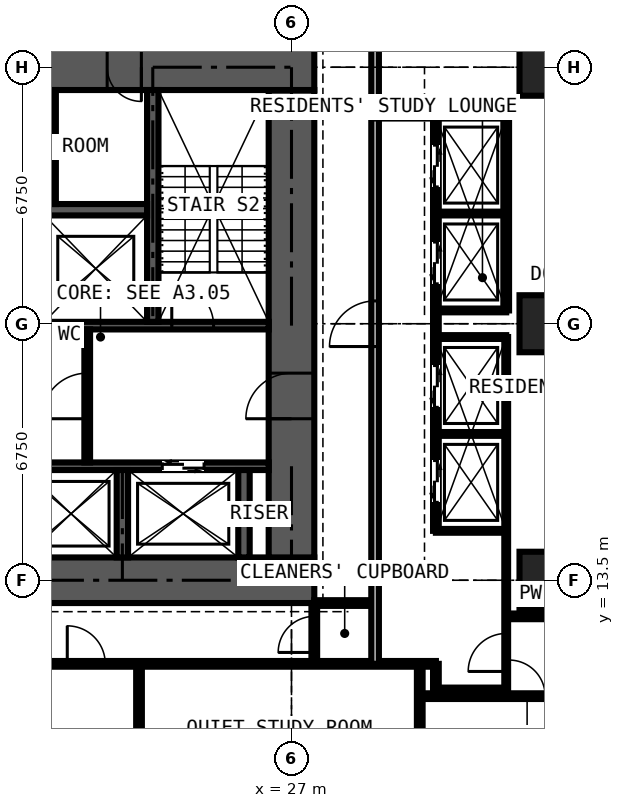
"""IFC4 building model, lengths in metres.
Left out: names, types, materials, properties, quantities, classifications, styles, units other than length and angle.
Written with IfcOpenShell. Run it as: python <this file> out.ifc"""

import sys

from ifc_helpers import new_model, si_unit, direction, frame, frame_2d, origin, origin_2d, place, context, subcontext, project, spatial, rectangle, extrude, element, fill, save


model = new_model("IFC4")
c1 = context("Model", 3, precision=1e-05, world=origin(), true_north=direction((0.0, 1.0)))
c2 = subcontext(c1, "Body", "Model", "MODEL_VIEW")
j1 = project(units=[si_unit("LENGTHUNIT", "METRE"), si_unit("PLANEANGLEUNIT", "RADIAN")], contexts=[c1])
p1 = place(None, origin())
s1 = spatial("IfcSite", under=j1, at=p1, CompositionType="ELEMENT")
p2 = place(p1, origin())
s2 = spatial("IfcBuilding", under=s1, at=p2, CompositionType="ELEMENT")
p3 = place(p2, frame((0.0, 0.0, 116.1)))
s3 = spatial("IfcBuildingStorey", under=s2, at=p3, CompositionType="ELEMENT", Elevation=116.1)
for number, where, z_axis, x_axis in (
    (1, (33.75, 13.5, 0.0), (0.0, 0.0, 1.0), (1.0, 0.0, 0.0)),
    (2, (33.75, 20.25, 0.0), (0.0, 0.0, 1.0), (1.0, 0.0, 0.0)),
    (3, (33.75, 27.0, 0.0), (0.0, 0.0, 1.0), (1.0, 0.0, 0.0)),
):
    element("IfcColumn", number, at=place(p3, frame(where, z_axis=z_axis, x_axis=x_axis)), inside=s3, PredefinedType="COLUMN", context=c2, shape_type="SweptSolid", body=[
        extrude(rectangle(XDim=1.5, YDim=1.5, at=origin_2d()), origin(), (0.0, 0.0, 1.0), 3.6),
    ])
p4 = place(p3, frame((12.9, 13.5, 0.0), z_axis=(0.0, 0.0, 1.0), x_axis=(1.0, 0.0, 0.0)))
e4 = element("IfcWall", 4, at=p4, inside=s3, PredefinedType="SHEAR", context=c2, shape_type="SweptSolid", body=[
    extrude(rectangle(XDim=14.7, YDim=1.2, at=frame_2d((7.35, 0.0))), origin(), (0.0, 0.0, 1.0), 3.6),
])
p5 = place(p3, frame((27.0, 14.1, 0.0), z_axis=(0.0, 0.0, 1.0), x_axis=(0.0, 1.0, 0.0)))
e5 = element("IfcWall", 5, at=p5, inside=s3, PredefinedType="SHEAR", context=c2, shape_type="SweptSolid", body=[
    extrude(rectangle(XDim=12.3, YDim=1.2, at=frame_2d((6.15, 0.0))), origin(), (0.0, 0.0, 1.0), 3.6),
])
p6 = place(p5, frame((3.65, 0.0, 0.0)))
e6 = element("IfcOpeningElement", 6, at=p6, cuts=e5, PredefinedType="OPENING", context=c2, shape_type="SweptSolid", body=[
    extrude(rectangle(XDim=1.2, YDim=2.2, at=frame_2d((0.6, 1.1))), frame((0.0, 0.61, 0.0), z_axis=(0.0, -1.0, 0.0), x_axis=(1.0, 0.0, 0.0)), (0.0, 0.0, 1.0), 1.22),
])
p7 = place(p3, frame((27.6, 27.0, 0.0), z_axis=(0.0, 0.0, 1.0), x_axis=(-1.0, 0.0, 0.0)))
e7 = element("IfcWall", 7, at=p7, inside=s3, PredefinedType="SHEAR", context=c2, shape_type="SweptSolid", body=[
    extrude(rectangle(XDim=14.7, YDim=1.2, at=frame_2d((7.35, 0.0))), origin(), (0.0, 0.0, 1.0), 3.6),
])
p8 = place(p7, frame((4.55, 0.0, 0.0)))
e8 = element("IfcOpeningElement", 8, at=p8, cuts=e7, PredefinedType="OPENING", context=c2, shape_type="SweptSolid", body=[
    extrude(rectangle(XDim=0.9, YDim=2.2, at=frame_2d((0.45, 1.1))), frame((0.0, 0.61, 0.0), z_axis=(0.0, -1.0, 0.0), x_axis=(1.0, 0.0, 0.0)), (0.0, 0.0, 1.0), 1.22),
])
p9 = place(p7, frame((7.525, 0.0, 0.0)))
e9 = element("IfcOpeningElement", 9, at=p9, cuts=e7, PredefinedType="OPENING", context=c2, shape_type="SweptSolid", body=[
    extrude(rectangle(XDim=1.0, YDim=2.2, at=frame_2d((0.5, 1.1))), frame((0.0, 0.61, 0.0), z_axis=(0.0, -1.0, 0.0), x_axis=(1.0, 0.0, 0.0)), (0.0, 0.0, 1.0), 1.22),
])
p10 = place(p3, frame((14.1, 16.5, 0.0), z_axis=(0.0, 0.0, 1.0), x_axis=(1.0, 0.0, 0.0)))
e10 = element("IfcWall", 10, at=p10, inside=s3, PredefinedType="SHEAR", context=c2, shape_type="SweptSolid", body=[
    extrude(rectangle(XDim=12.3, YDim=0.2, at=frame_2d((6.15, 0.0))), origin(), (0.0, 0.0, 1.0), 3.6),
])
p11 = place(p10, frame((0.9, 0.0, 0.0)))
e11 = element("IfcOpeningElement", 11, at=p11, cuts=e10, PredefinedType="OPENING", context=c2, shape_type="SweptSolid", body=[
    extrude(rectangle(XDim=1.1, YDim=2.2, at=frame_2d((0.55, 1.1))), frame((0.0, 0.11, 0.0), z_axis=(0.0, -1.0, 0.0), x_axis=(1.0, 0.0, 0.0)), (0.0, 0.0, 1.0), 0.22),
])
p12 = place(p10, frame((9.5, 0.0, 0.0)))
e12 = element("IfcOpeningElement", 12, at=p12, cuts=e10, PredefinedType="OPENING", context=c2, shape_type="SweptSolid", body=[
    extrude(rectangle(XDim=1.1, YDim=2.2, at=frame_2d((0.55, 1.1))), frame((0.0, 0.11, 0.0), z_axis=(0.0, -1.0, 0.0), x_axis=(1.0, 0.0, 0.0)), (0.0, 0.0, 1.0), 0.22),
])
p13 = place(p3, frame((14.1, 20.2, 0.0), z_axis=(0.0, 0.0, 1.0), x_axis=(1.0, 0.0, 0.0)))
e13 = element("IfcWall", 13, at=p13, inside=s3, PredefinedType="SHEAR", context=c2, shape_type="SweptSolid", body=[
    extrude(rectangle(XDim=12.3, YDim=0.2, at=frame_2d((6.15, 0.0))), origin(), (0.0, 0.0, 1.0), 3.6),
])
p14 = place(p13, frame((0.35, 0.0, 0.0)))
e14 = element("IfcOpeningElement", 14, at=p14, cuts=e13, PredefinedType="OPENING", context=c2, shape_type="SweptSolid", body=[
    extrude(rectangle(XDim=1.1, YDim=2.2, at=frame_2d((0.55, 1.1))), frame((0.0, 0.11, 0.0), z_axis=(0.0, -1.0, 0.0), x_axis=(1.0, 0.0, 0.0)), (0.0, 0.0, 1.0), 0.22),
])
p15 = place(p13, frame((9.75, 0.0, 0.0)))
e15 = element("IfcOpeningElement", 15, at=p15, cuts=e13, PredefinedType="OPENING", context=c2, shape_type="SweptSolid", body=[
    extrude(rectangle(XDim=1.1, YDim=2.2, at=frame_2d((0.55, 1.1))), frame((0.0, 0.11, 0.0), z_axis=(0.0, -1.0, 0.0), x_axis=(1.0, 0.0, 0.0)), (0.0, 0.0, 1.0), 0.22),
])
p16 = place(p3, frame((23.35, 20.3, 0.0), z_axis=(0.0, 0.0, 1.0), x_axis=(0.0, 1.0, 0.0)))
e16 = element("IfcWall", 16, at=p16, inside=s3, PredefinedType="SHEAR", context=c2, shape_type="SweptSolid", body=[
    extrude(rectangle(XDim=6.1, YDim=0.3, at=frame_2d((3.05, 0.0))), origin(), (0.0, 0.0, 1.0), 3.6),
])
p17 = place(p3, frame((17.3, 23.25, 0.0), z_axis=(0.0, 0.0, 1.0), x_axis=(1.0, 0.0, 0.0)))
e17 = element("IfcWall", 17, at=p17, inside=s3, PredefinedType="SHEAR", context=c2, shape_type="SweptSolid", body=[
    extrude(rectangle(XDim=5.9, YDim=0.3, at=frame_2d((2.95, 0.0))), origin(), (0.0, 0.0, 1.0), 3.6),
])
for number, where, z_axis, x_axis in (
    (18, (22.55, 14.1, 0.0), (0.0, 0.0, 1.0), (0.0, 1.0, 0.0)),
    (19, (25.75, 14.1, 0.0), (0.0, 0.0, 1.0), (0.0, 1.0, 0.0)),
):
    element("IfcWall", number, at=place(p3, frame(where, z_axis=z_axis, x_axis=x_axis)), inside=s3, PredefinedType="SHEAR", context=c2, shape_type="SweptSolid", body=[
        extrude(rectangle(XDim=2.3, YDim=0.3, at=frame_2d((1.15, 0.0))), origin(), (0.0, 0.0, 1.0), 3.6),
    ])
p18 = place(p3, frame((21.625, 16.6, 0.0), z_axis=(0.0, 0.0, 1.0), x_axis=(0.0, 1.0, 0.0)))
e20 = element("IfcWall", 20, at=p18, inside=s3, PredefinedType="PARTITIONING", context=c2, shape_type="SweptSolid", body=[
    extrude(rectangle(XDim=3.5, YDim=0.15, at=frame_2d((1.75, 0.0))), origin(), (0.0, 0.0, 1.0), 3.375),
])
p19 = place(p18, frame((1.15, 0.0, 0.0)))
e21 = element("IfcOpeningElement", 21, at=p19, cuts=e20, PredefinedType="OPENING", context=c2, shape_type="SweptSolid", body=[
    extrude(rectangle(XDim=1.2, YDim=2.2, at=frame_2d((0.6, 1.1))), frame((0.0, 0.085, 0.0), z_axis=(0.0, -1.0, 0.0), x_axis=(1.0, 0.0, 0.0)), (0.0, 0.0, 1.0), 0.17),
])
p20 = place(p3, frame((20.725, 23.4, 0.0), z_axis=(0.0, 0.0, 1.0), x_axis=(0.0, 1.0, 0.0)))
e22 = element("IfcWall", 22, at=p20, inside=s3, PredefinedType="PARTITIONING", context=c2, shape_type="SweptSolid", body=[
    extrude(rectangle(XDim=3.0, YDim=0.15, at=frame_2d((1.5, 0.0))), origin(), (0.0, 0.0, 1.0), 3.375),
])
p21 = place(p3, frame((10.125, 11.3, 0.0), z_axis=(0.0, 0.0, 1.0), x_axis=(1.0, 0.0, 0.0)))
e23 = element("IfcWall", 23, at=p21, inside=s3, PredefinedType="PARTITIONING", context=c2, shape_type="SweptSolid", body=[
    extrude(rectangle(XDim=20.675, YDim=0.15, at=frame_2d((10.337, 0.0))), origin(), (0.0, 0.0, 1.0), 3.375),
])
p22 = place(p21, frame((8.375, 0.0, 0.0)))
e24 = element("IfcOpeningElement", 24, at=p22, cuts=e23, PredefinedType="OPENING", context=c2, shape_type="SweptSolid", body=[
    extrude(rectangle(XDim=1.0, YDim=2.2, at=frame_2d((0.5, 1.1))), frame((0.0, 0.085, 0.0), z_axis=(0.0, -1.0, 0.0), x_axis=(1.0, 0.0, 0.0)), (0.0, 0.0, 1.0), 0.17),
])
p23 = place(p21, frame((10.975, 0.0, 0.0)))
e25 = element("IfcOpeningElement", 25, at=p23, cuts=e23, PredefinedType="OPENING", context=c2, shape_type="SweptSolid", body=[
    extrude(rectangle(XDim=1.0, YDim=2.2, at=frame_2d((0.5, 1.1))), frame((0.0, 0.085, 0.0), z_axis=(0.0, -1.0, 0.0), x_axis=(1.0, 0.0, 0.0)), (0.0, 0.0, 1.0), 0.17),
])
p24 = place(p21, frame((3.925, 0.0, 0.0)))
e26 = element("IfcOpeningElement", 26, at=p24, cuts=e23, PredefinedType="OPENING", context=c2, shape_type="SweptSolid", body=[
    extrude(rectangle(XDim=0.95, YDim=2.2, at=frame_2d((0.475, 1.1))), frame((0.0, 0.085, 0.0), z_axis=(0.0, -1.0, 0.0), x_axis=(1.0, 0.0, 0.0)), (0.0, 0.0, 1.0), 0.17),
])
p25 = place(p3, frame((22.988, 5.65, 0.0), z_axis=(0.0, 0.0, 1.0), x_axis=(0.0, 1.0, 0.0)))
e27 = element("IfcWall", 27, at=p25, inside=s3, PredefinedType="PARTITIONING", context=c2, shape_type="SweptSolid", body=[
    extrude(rectangle(XDim=5.65, YDim=0.15, at=frame_2d((2.825, 0.0))), origin(), (0.0, 0.0, 1.0), 3.375),
])
p26 = place(p3, frame((27.6, 11.3, 0.0), z_axis=(0.0, 0.0, 1.0), x_axis=(0.0, 1.0, 0.0)))
e28 = element("IfcWall", 28, at=p26, inside=s3, PredefinedType="PARTITIONING", context=c2, shape_type="SweptSolid", body=[
    extrude(rectangle(XDim=1.6, YDim=0.15, at=frame_2d((0.8, 0.0))), origin(), (0.0, 0.0, 1.0), 3.375),
])
p27 = place(p26, frame((0.3, 0.0, 0.0)))
e29 = element("IfcOpeningElement", 29, at=p27, cuts=e28, PredefinedType="OPENING", context=c2, shape_type="SweptSolid", body=[
    extrude(rectangle(XDim=0.95, YDim=2.2, at=frame_2d((0.475, 1.1))), frame((0.0, 0.085, 0.0), z_axis=(0.0, -1.0, 0.0), x_axis=(1.0, 0.0, 0.0)), (0.0, 0.0, 1.0), 0.17),
])
p28 = place(p3, frame((27.6, 12.9, 0.0), z_axis=(0.0, 0.0, 1.0), x_axis=(1.0, 0.0, 0.0)))
e30 = element("IfcWall", 30, at=p28, inside=s3, PredefinedType="PARTITIONING", context=c2, shape_type="SweptSolid", body=[
    extrude(rectangle(XDim=1.6, YDim=0.15, at=frame_2d((0.8, 0.0))), origin(), (0.0, 0.0, 1.0), 2.806),
])
p29 = place(p3, frame((29.2, 11.3, 0.0), z_axis=(0.0, 0.0, 1.0), x_axis=(0.0, 1.0, 0.0)))
e31 = element("IfcWall", 31, at=p29, inside=s3, PredefinedType="PARTITIONING", context=c2, shape_type="SweptSolid", body=[
    extrude(rectangle(XDim=17.9, YDim=0.2, at=frame_2d((8.95, 0.0))), origin(), (0.0, 0.0, 1.0), 3.375),
])
p30 = place(p29, frame((8.35, 0.0, 0.0)))
e32 = element("IfcOpeningElement", 32, at=p30, cuts=e31, PredefinedType="OPENING", context=c2, shape_type="SweptSolid", body=[
    extrude(rectangle(XDim=1.2, YDim=2.2, at=frame_2d((0.6, 1.1))), frame((0.0, 0.11, 0.0), z_axis=(0.0, -1.0, 0.0), x_axis=(1.0, 0.0, 0.0)), (0.0, 0.0, 1.0), 0.22),
])
p31 = place(p3, frame((29.2, 25.7, 0.0), z_axis=(0.0, 0.0, 1.0), x_axis=(1.0, 0.0, 0.0)))
e33 = element("IfcWall", 33, at=p31, inside=s3, PredefinedType="SHEAR", context=c2, shape_type="SweptSolid", body=[
    extrude(rectangle(XDim=3.45, YDim=0.1, at=frame_2d((1.725, 0.0))), origin(), (0.0, 0.0, 1.0), 3.375),
])
p32 = place(p3, frame((30.375, -0.734, 0.0), z_axis=(0.0, 0.0, 1.0), x_axis=(0.0, 1.0, 0.0)))
e34 = element("IfcWall", 34, at=p32, inside=s3, PredefinedType="PARTITIONING", context=c2, shape_type="SweptSolid", body=[
    extrude(rectangle(XDim=12.034, YDim=0.15, at=frame_2d((6.017, 0.0))), origin(), (0.0, 0.0, 1.0), 3.375),
])
p33 = place(p32, frame((5.134, 0.0, 0.0)))
e35 = element("IfcOpeningElement", 35, at=p33, cuts=e34, PredefinedType="OPENING", context=c2, shape_type="SweptSolid", body=[
    extrude(rectangle(XDim=1.0, YDim=2.2, at=frame_2d((0.5, 1.1))), frame((0.0, 0.085, 0.0), z_axis=(0.0, -1.0, 0.0), x_axis=(1.0, 0.0, 0.0)), (0.0, 0.0, 1.0), 0.17),
])
p34 = place(p3, frame((30.375, 10.45, 0.0), z_axis=(0.0, 0.0, 1.0), x_axis=(1.0, 0.0, 0.0)))
e36 = element("IfcWall", 36, at=p34, inside=s3, PredefinedType="PARTITIONING", context=c2, shape_type="SweptSolid", body=[
    extrude(rectangle(XDim=4.475, YDim=0.15, at=frame_2d((2.238, 0.0))), origin(), (0.0, 0.0, 1.0), 3.375),
])
p35 = place(p34, frame((2.35, 0.0, 0.0)))
e37 = element("IfcOpeningElement", 37, at=p35, cuts=e36, PredefinedType="OPENING", context=c2, shape_type="SweptSolid", body=[
    extrude(rectangle(XDim=0.95, YDim=2.2, at=frame_2d((0.475, 1.1))), frame((0.0, 0.085, 0.0), z_axis=(0.0, -1.0, 0.0), x_axis=(1.0, 0.0, 0.0)), (0.0, 0.0, 1.0), 0.17),
])
p36 = place(p3, frame((30.8, 10.6, 0.0), z_axis=(0.0, 0.0, 1.0), x_axis=(0.0, 1.0, 0.0)))
e38 = element("IfcWall", 38, at=p36, inside=s3, PredefinedType="PARTITIONING", context=c2, shape_type="SweptSolid", body=[
    extrude(rectangle(XDim=0.7, YDim=0.15, at=frame_2d((0.35, 0.0))), origin(), (0.0, 0.0, 1.0), 3.375),
])
p37 = place(p3, frame((30.8, 10.6, 0.0), z_axis=(0.0, 0.0, 1.0), x_axis=(1.0, 0.0, 0.0)))
e39 = element("IfcWall", 39, at=p37, inside=s3, PredefinedType="PARTITIONING", context=c2, shape_type="SweptSolid", body=[
    extrude(rectangle(XDim=1.85, YDim=0.15, at=frame_2d((0.925, 0.0))), origin(), (0.0, 0.0, 1.0), 3.375),
])
p38 = place(p3, frame((30.8, 14.8, 0.0), z_axis=(0.0, 0.0, 1.0), x_axis=(0.0, 1.0, 0.0)))
e40 = element("IfcWall", 40, at=p38, inside=s3, PredefinedType="PARTITIONING", context=c2, shape_type="SweptSolid", body=[
    extrude(rectangle(XDim=10.9, YDim=0.15, at=frame_2d((5.45, 0.0))), origin(), (0.0, 0.0, 1.0), 3.375),
])
p39 = place(p38, frame((0.75, 0.0, 0.0)))
e41 = element("IfcOpeningElement", 41, at=p39, cuts=e40, PredefinedType="OPENING", context=c2, shape_type="SweptSolid", body=[
    extrude(rectangle(XDim=1.1, YDim=2.2, at=frame_2d((0.55, 1.1))), frame((0.0, 0.085, 0.0), z_axis=(0.0, -1.0, 0.0), x_axis=(1.0, 0.0, 0.0)), (0.0, 0.0, 1.0), 0.17),
])
p40 = place(p38, frame((3.25, 0.0, 0.0)))
e42 = element("IfcOpeningElement", 42, at=p40, cuts=e40, PredefinedType="OPENING", context=c2, shape_type="SweptSolid", body=[
    extrude(rectangle(XDim=1.1, YDim=2.2, at=frame_2d((0.55, 1.1))), frame((0.0, 0.085, 0.0), z_axis=(0.0, -1.0, 0.0), x_axis=(1.0, 0.0, 0.0)), (0.0, 0.0, 1.0), 0.17),
])
p41 = place(p38, frame((6.5, 0.0, 0.0)))
e43 = element("IfcOpeningElement", 43, at=p41, cuts=e40, PredefinedType="OPENING", context=c2, shape_type="SweptSolid", body=[
    extrude(rectangle(XDim=1.1, YDim=2.2, at=frame_2d((0.55, 1.1))), frame((0.0, 0.085, 0.0), z_axis=(0.0, -1.0, 0.0), x_axis=(1.0, 0.0, 0.0)), (0.0, 0.0, 1.0), 0.17),
])
p42 = place(p38, frame((9.05, 0.0, 0.0)))
e44 = element("IfcOpeningElement", 44, at=p42, cuts=e40, PredefinedType="OPENING", context=c2, shape_type="SweptSolid", body=[
    extrude(rectangle(XDim=1.1, YDim=2.2, at=frame_2d((0.55, 1.1))), frame((0.0, 0.085, 0.0), z_axis=(0.0, -1.0, 0.0), x_axis=(1.0, 0.0, 0.0)), (0.0, 0.0, 1.0), 0.17),
])
for number, where, z_axis, x_axis in (
    (45, (30.8, 14.8, 0.0), (0.0, 0.0, 1.0), (1.0, 0.0, 0.0)),
    (46, (30.8, 17.35, 0.0), (0.0, 0.0, 1.0), (1.0, 0.0, 0.0)),
    (47, (30.8, 19.9, 0.0), (0.0, 0.0, 1.0), (1.0, 0.0, 0.0)),
    (48, (30.8, 20.6, 0.0), (0.0, 0.0, 1.0), (1.0, 0.0, 0.0)),
    (49, (30.8, 23.15, 0.0), (0.0, 0.0, 1.0), (1.0, 0.0, 0.0)),
):
    element("IfcWall", number, at=place(p3, frame(where, z_axis=z_axis, x_axis=x_axis)), inside=s3, PredefinedType="SHEAR", context=c2, shape_type="SweptSolid", body=[
        extrude(rectangle(XDim=1.85, YDim=0.1, at=frame_2d((0.925, 0.0))), origin(), (0.0, 0.0, 1.0), 3.375),
    ])
p43 = place(p3, frame((32.65, 10.6, 0.0), z_axis=(0.0, 0.0, 1.0), x_axis=(0.0, 1.0, 0.0)))
e50 = element("IfcWall", 50, at=p43, inside=s3, PredefinedType="SHEAR", context=c2, shape_type="SweptSolid", body=[
    extrude(rectangle(XDim=9.3, YDim=0.1, at=frame_2d((4.65, 0.0))), origin(), (0.0, 0.0, 1.0), 3.375),
])
p44 = place(p43, frame((0.5, 0.0, 0.0)))
e51 = element("IfcOpeningElement", 51, at=p44, cuts=e50, PredefinedType="OPENING", context=c2, shape_type="SweptSolid", body=[
    extrude(rectangle(XDim=1.0, YDim=2.2, at=frame_2d((0.5, 1.1))), frame((0.0, 0.06, 0.0), z_axis=(0.0, -1.0, 0.0), x_axis=(1.0, 0.0, 0.0)), (0.0, 0.0, 1.0), 0.12),
])
p45 = place(p3, frame((32.65, 12.55, 0.0), z_axis=(0.0, 0.0, 1.0), x_axis=(1.0, 0.0, 0.0)))
e52 = element("IfcWall", 52, at=p45, inside=s3, PredefinedType="PARTITIONING", context=c2, shape_type="SweptSolid", body=[
    extrude(rectangle(XDim=2.2, YDim=0.15, at=frame_2d((1.1, 0.0))), origin(), (0.0, 0.0, 1.0), 3.375),
])
p46 = place(p3, frame((32.65, 20.6, 0.0), z_axis=(0.0, 0.0, 1.0), x_axis=(0.0, 1.0, 0.0)))
e53 = element("IfcWall", 53, at=p46, inside=s3, PredefinedType="PARTITIONING", context=c2, shape_type="SweptSolid", body=[
    extrude(rectangle(XDim=5.1, YDim=0.15, at=frame_2d((2.55, 0.0))), origin(), (0.0, 0.0, 1.0), 3.375),
])
p47 = place(p12, origin())
e54 = element("IfcDoor", 54, at=p47, inside=s3, OperationType="DOUBLE_DOOR_SLIDING", PredefinedType="DOOR", context=c2, shape_type="SweptSolid", body=[
    extrude(rectangle(XDim=1.1, YDim=2.2, at=frame_2d((0.55, 1.1))), frame((0.0, 0.025, 0.0), z_axis=(0.0, -1.0, 0.0), x_axis=(1.0, 0.0, 0.0)), (0.0, 0.0, 1.0), 0.05),
])
fill(e12, e54)
p48 = place(p6, origin())
e55 = element("IfcDoor", 55, at=p48, inside=s3, OperationType="DOUBLE_DOOR_SINGLE_SWING", PredefinedType="DOOR", context=c2, shape_type="SweptSolid", body=[
    extrude(rectangle(XDim=1.2, YDim=2.2, at=frame_2d((0.6, 1.1))), frame((0.0, 0.025, 0.0), z_axis=(0.0, -1.0, 0.0), x_axis=(1.0, 0.0, 0.0)), (0.0, 0.0, 1.0), 0.05),
])
fill(e6, e55)
p49 = place(p19, origin())
e56 = element("IfcDoor", 56, at=p49, inside=s3, OperationType="DOUBLE_DOOR_SINGLE_SWING", PredefinedType="DOOR", context=c2, shape_type="SweptSolid", body=[
    extrude(rectangle(XDim=1.2, YDim=2.2, at=frame_2d((0.6, 1.1))), frame((0.0, 0.025, 0.0), z_axis=(0.0, -1.0, 0.0), x_axis=(1.0, 0.0, 0.0)), (0.0, 0.0, 1.0), 0.05),
])
fill(e21, e56)
p50 = place(p8, origin())
e57 = element("IfcDoor", 57, at=p50, inside=s3, OperationType="SINGLE_SWING_LEFT", PredefinedType="DOOR", context=c2, shape_type="SweptSolid", body=[
    extrude(rectangle(XDim=0.9, YDim=2.2, at=frame_2d((0.45, 1.1))), frame((0.0, 0.4, 0.0), z_axis=(0.0, -1.0, 0.0), x_axis=(1.0, 0.0, 0.0)), (0.0, 0.0, 1.0), 0.8),
])
fill(e8, e57)
p51 = place(p15, origin())
e58 = element("IfcDoor", 58, at=p51, inside=s3, OperationType="SINGLE_SWING_LEFT", PredefinedType="DOOR", context=c2, shape_type="SweptSolid", body=[
    extrude(rectangle(XDim=1.1, YDim=2.2, at=frame_2d((0.55, 1.1))), frame((0.0, 0.025, 0.0), z_axis=(0.0, -1.0, 0.0), x_axis=(1.0, 0.0, 0.0)), (0.0, 0.0, 1.0), 0.05),
])
fill(e15, e58)
p52 = place(p27, origin())
e59 = element("IfcDoor", 59, at=p52, inside=s3, OperationType="SINGLE_SWING_LEFT", PredefinedType="DOOR", context=c2, shape_type="SweptSolid", body=[
    extrude(rectangle(XDim=0.95, YDim=2.2, at=frame_2d((0.475, 1.1))), frame((0.0, 0.025, 0.0), z_axis=(0.0, -1.0, 0.0), x_axis=(1.0, 0.0, 0.0)), (0.0, 0.0, 1.0), 0.05),
])
fill(e29, e59)
p53 = place(p23, origin())
e60 = element("IfcDoor", 60, at=p53, inside=s3, OperationType="SINGLE_SWING_LEFT", PredefinedType="DOOR", context=c2, shape_type="SweptSolid", body=[
    extrude(rectangle(XDim=1.0, YDim=2.2, at=frame_2d((0.5, 1.1))), frame((0.0, 0.025, 0.0), z_axis=(0.0, -1.0, 0.0), x_axis=(1.0, 0.0, 0.0)), (0.0, 0.0, 1.0), 0.05),
])
fill(e25, e60)
p54 = place(p44, origin())
e61 = element("IfcDoor", 61, at=p54, inside=s3, OperationType="SINGLE_SWING_LEFT", PredefinedType="DOOR", context=c2, shape_type="SweptSolid", body=[
    extrude(rectangle(XDim=1.0, YDim=2.2, at=frame_2d((0.5, 1.1))), frame((0.0, 0.025, 0.0), z_axis=(0.0, -1.0, 0.0), x_axis=(1.0, 0.0, 0.0)), (0.0, 0.0, 1.0), 0.05),
])
fill(e51, e61)
p55 = place(p35, origin())
e62 = element("IfcDoor", 62, at=p55, inside=s3, OperationType="SINGLE_SWING_LEFT", PredefinedType="DOOR", context=c2, shape_type="SweptSolid", body=[
    extrude(rectangle(XDim=0.95, YDim=2.2, at=frame_2d((0.475, 1.1))), frame((0.0, 0.025, 0.0), z_axis=(0.0, -1.0, 0.0), x_axis=(1.0, 0.0, 0.0)), (0.0, 0.0, 1.0), 0.05),
])
fill(e37, e62)
p56 = place(p39, origin())
e63 = element("IfcDoor", 63, at=p56, inside=s3, OperationType="DOUBLE_DOOR_SLIDING", PredefinedType="DOOR", context=c2, shape_type="SweptSolid", body=[
    extrude(rectangle(XDim=1.1, YDim=2.2, at=frame_2d((0.55, 1.1))), frame((0.0, 0.025, 0.0), z_axis=(0.0, -1.0, 0.0), x_axis=(1.0, 0.0, 0.0)), (0.0, 0.0, 1.0), 0.05),
])
fill(e41, e63)
p57 = place(p40, origin())
e64 = element("IfcDoor", 64, at=p57, inside=s3, OperationType="DOUBLE_DOOR_SLIDING", PredefinedType="DOOR", context=c2, shape_type="SweptSolid", body=[
    extrude(rectangle(XDim=1.1, YDim=2.2, at=frame_2d((0.55, 1.1))), frame((0.0, 0.025, 0.0), z_axis=(0.0, -1.0, 0.0), x_axis=(1.0, 0.0, 0.0)), (0.0, 0.0, 1.0), 0.05),
])
fill(e42, e64)
p58 = place(p41, origin())
e65 = element("IfcDoor", 65, at=p58, inside=s3, OperationType="DOUBLE_DOOR_SLIDING", PredefinedType="DOOR", context=c2, shape_type="SweptSolid", body=[
    extrude(rectangle(XDim=1.1, YDim=2.2, at=frame_2d((0.55, 1.1))), frame((0.0, 0.025, 0.0), z_axis=(0.0, -1.0, 0.0), x_axis=(1.0, 0.0, 0.0)), (0.0, 0.0, 1.0), 0.05),
])
fill(e43, e65)
p59 = place(p42, origin())
e66 = element("IfcDoor", 66, at=p59, inside=s3, OperationType="DOUBLE_DOOR_SLIDING", PredefinedType="DOOR", context=c2, shape_type="SweptSolid", body=[
    extrude(rectangle(XDim=1.1, YDim=2.2, at=frame_2d((0.55, 1.1))), frame((0.0, 0.025, 0.0), z_axis=(0.0, -1.0, 0.0), x_axis=(1.0, 0.0, 0.0)), (0.0, 0.0, 1.0), 0.05),
])
fill(e44, e66)
p60 = place(p30, origin())
e67 = element("IfcDoor", 67, at=p60, inside=s3, OperationType="DOUBLE_DOOR_SINGLE_SWING", PredefinedType="DOOR", context=c2, shape_type="SweptSolid", body=[
    extrude(rectangle(XDim=1.2, YDim=2.2, at=frame_2d((0.6, 1.1))), frame((0.0, 0.025, 0.0), z_axis=(0.0, -1.0, 0.0), x_axis=(1.0, 0.0, 0.0)), (0.0, 0.0, 1.0), 0.05),
])
fill(e32, e67)
save(model, sys.argv[1])
